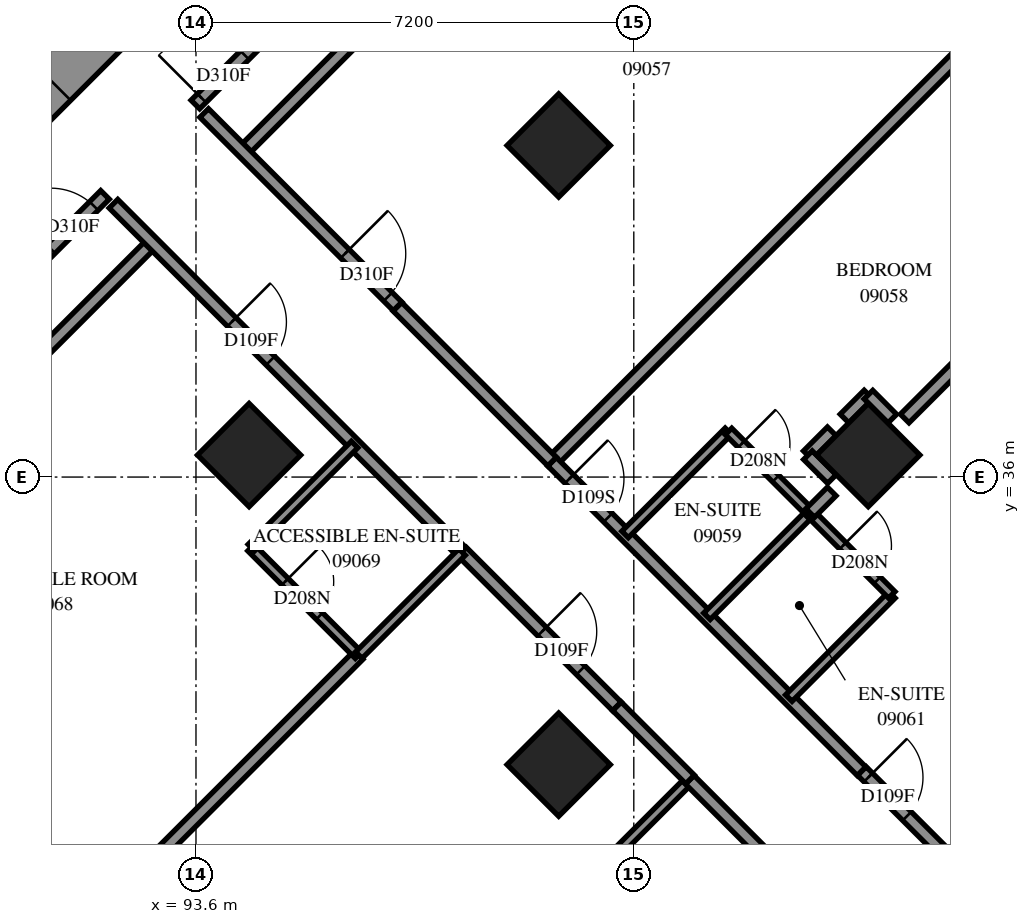
"""IFC4 building model, lengths in metres.
Left out: names, types, materials, properties, quantities, classifications, styles, units other than length and angle.
Written with IfcOpenShell. Run it as: python <this file> out.ifc"""

import sys

from ifc_helpers import new_model, si_unit, direction, frame, frame_2d, origin, origin_2d, place, context, subcontext, project, spatial, polyline, rectangle, outline, extrude, element, fill, save


model = new_model("IFC4")
c1 = context("Model", 3, precision=1e-05, world=origin(), true_north=direction((0.0, 1.0)))
c2 = subcontext(c1, "Body", "Model", "MODEL_VIEW")
j1 = project(units=[si_unit("LENGTHUNIT", "METRE"), si_unit("PLANEANGLEUNIT", "RADIAN")], contexts=[c1])
p1 = place(None, origin())
s1 = spatial("IfcSite", under=j1, at=p1, CompositionType="ELEMENT")
p2 = place(p1, origin())
s2 = spatial("IfcBuilding", under=s1, at=p2, CompositionType="ELEMENT")
p3 = place(p2, frame((0.0, 0.0, 37.2)))
s3 = spatial("IfcBuildingStorey", under=s2, at=p3, CompositionType="ELEMENT", Elevation=37.2)
for number, where, z_axis, x_axis in (
    (1, (99.565, 41.453, 0.0), (0.0, 0.0, 1.0), (0.707, -0.707, 0.0)),
    (2, (94.474, 36.362, 0.0), (0.0, 0.0, 1.0), (0.707, -0.707, 0.0)),
    (3, (104.656, 36.362, 0.0), (0.0, 0.0, 1.0), (0.707, -0.707, 0.0)),
    (4, (99.565, 31.271, 0.0), (0.0, 0.0, 1.0), (0.707, -0.707, 0.0)),
):
    element("IfcColumn", number, at=place(p3, frame(where, z_axis=z_axis, x_axis=x_axis)), inside=s3, PredefinedType="COLUMN", context=c2, shape_type="SweptSolid", body=[
        extrude(rectangle(XDim=1.2, YDim=1.2, at=origin_2d()), origin(), (0.0, 0.0, 1.0), 3.1),
    ])
p4 = place(p3, frame((87.19, 38.554, -0.3), z_axis=(0.0, 0.0, 1.0), x_axis=(0.707103309, 0.7071102534, 0.0)))
e5 = element("IfcWall", 5, at=p4, inside=s3, PredefinedType="SHEAR", context=c2, shape_type="SweptSolid", body=[
    extrude(rectangle(XDim=14.4, YDim=1.0, at=frame_2d((7.2, 0.0))), origin(), (0.0, 0.0, 1.0), 2.7),
])
p5 = place(p4, frame((4.55, 0.0, 0.3)))
e6 = element("IfcOpeningElement", 6, at=p5, cuts=e5, PredefinedType="OPENING", context=c2, shape_type="SweptSolid", body=[
    extrude(rectangle(XDim=1.1, YDim=2.1, at=frame_2d((0.55, 1.05))), frame((0.0, 0.51, 0.0), z_axis=(0.0, -1.0, 0.0), x_axis=(1.0, 0.0, 0.0)), (0.0, 0.0, 1.0), 1.02),
])
p6 = place(p4, frame((11.35, 0.0, 0.3)))
e7 = element("IfcOpeningElement", 7, at=p6, cuts=e5, PredefinedType="OPENING", context=c2, shape_type="SweptSolid", body=[
    extrude(rectangle(XDim=1.1, YDim=2.1, at=frame_2d((0.55, 1.05))), frame((0.0, 0.51, 0.0), z_axis=(0.0, -1.0, 0.0), x_axis=(1.0, 0.0, 0.0)), (0.0, 0.0, 1.0), 1.02),
])
p7 = place(p3, frame((88.129, 30.665, 0.0), z_axis=(0.0, 0.0, 1.0), x_axis=(0.774508234, -0.6325638271, 0.0)))
e8 = element("IfcWall", 8, at=p7, inside=s3, PredefinedType="SOLIDWALL", context=c2, shape_type="SweptSolid", body=[
    extrude(outline(polyline([(-0.028, -0.275), (3.868, -0.275), (3.924, 0.275), (0.028, 0.275), (-0.028, -0.275)])), origin(), (0.0, 0.0, 1.0), 3.1),
])
p8 = place(p7, frame((0.678, 0.0, 0.5)))
e9 = element("IfcOpeningElement", 9, at=p8, cuts=e8, PredefinedType="OPENING", context=c2, shape_type="SweptSolid", body=[
    extrude(rectangle(XDim=2.8, YDim=2.45, at=frame_2d((1.4, 1.225))), frame((0.0, 0.285, 0.0), z_axis=(0.0, -1.0, 0.0), x_axis=(1.0, 0.0, 0.0)), (0.0, 0.0, 1.0), 0.57),
])
p9 = place(p3, frame((99.459, 36.255, 0.0), z_axis=(0.0, 0.0, 1.0), x_axis=(0.7071907307, 0.7070228217, 0.0)))
e10 = element("IfcWall", 10, at=p9, inside=s3, PredefinedType="PARTITIONING", context=c2, shape_type="SweptSolid", body=[
    extrude(rectangle(XDim=11.911, YDim=0.2, at=frame_2d((5.956, 0.0))), origin(), (0.0, 0.0, 1.0), 3.1),
])
p10 = place(p3, frame((94.367, 41.349, 0.0), z_axis=(0.0, 0.0, 1.0), x_axis=(0.7071109931, 0.7071025693, 0.0)))
e11 = element("IfcWall", 11, at=p10, inside=s3, PredefinedType="PARTITIONING", context=c2, shape_type="SweptSolid", body=[
    extrude(rectangle(XDim=11.871, YDim=0.2, at=frame_2d((5.936, 0.0))), origin(), (0.0, 0.0, 1.0), 3.1),
])
p11 = place(p3, frame((93.59, 42.126, 0.0), z_axis=(0.0, 0.0, 1.0), x_axis=(0.7071067812, 0.7071067812, 0.0)))
e12 = element("IfcWall", 12, at=p11, inside=s3, PredefinedType="PARTITIONING", context=c2, shape_type="SweptSolid", body=[
    extrude(rectangle(XDim=9.849, YDim=0.2, at=frame_2d((4.924, 0.0))), origin(), (0.0, 0.0, 1.0), 3.1),
])
p12 = place(p11, frame((0.148, 0.0, 0.0)))
e13 = element("IfcOpeningElement", 13, at=p12, cuts=e12, PredefinedType="OPENING", context=c2, shape_type="SweptSolid", body=[
    extrude(rectangle(XDim=1.0, YDim=2.1, at=frame_2d((0.5, 1.05))), frame((0.0, 0.11, 0.0), z_axis=(0.0, -1.0, 0.0), x_axis=(1.0, 0.0, 0.0)), (0.0, 0.0, 1.0), 0.22),
])
p13 = place(p3, frame((86.33, 33.302, 0.0), z_axis=(0.0, 0.0, 1.0), x_axis=(0.7069989149, 0.707214631, 0.0)))
e14 = element("IfcWall", 14, at=p13, inside=s3, PredefinedType="PARTITIONING", context=c2, shape_type="SweptSolid", body=[
    extrude(rectangle(XDim=9.271, YDim=0.2, at=frame_2d((4.636, 0.0))), origin(), (0.0, 0.0, 1.0), 3.1),
])
p14 = place(p3, frame((92.243, 40.495, 0.0), z_axis=(0.0, 0.0, 1.0), x_axis=(0.7071067812, -0.7071067812, 0.0)))
e15 = element("IfcWall", 15, at=p14, inside=s3, PredefinedType="PARTITIONING", context=c2, shape_type="SweptSolid", body=[
    extrude(rectangle(XDim=8.101, YDim=0.2, at=frame_2d((4.05, 0.0))), origin(), (0.0, 0.0, 1.0), 3.1),
])
p15 = place(p14, frame((2.75, 0.0, 0.0)))
e16 = element("IfcOpeningElement", 16, at=p15, cuts=e15, PredefinedType="OPENING", context=c2, shape_type="SweptSolid", body=[
    extrude(rectangle(XDim=0.9, YDim=2.1, at=frame_2d((0.45, 1.05))), frame((0.0, 0.11, 0.0), z_axis=(0.0, -1.0, 0.0), x_axis=(1.0, 0.0, 0.0)), (0.0, 0.0, 1.0), 0.22),
])
p16 = place(p3, frame((86.836, 35.372, 0.0), z_axis=(0.0, 0.0, 1.0), x_axis=(0.7071067812, 0.7071067812, 0.0)))
e17 = element("IfcWall", 17, at=p16, inside=s3, PredefinedType="PARTITIONING", context=c2, shape_type="SweptSolid", body=[
    extrude(rectangle(XDim=7.45, YDim=0.2, at=frame_2d((3.725, 0.0))), origin(), (0.0, 0.0, 1.0), 3.1),
])
p17 = place(p16, frame((6.192, 0.0, 0.0)))
e18 = element("IfcOpeningElement", 18, at=p17, cuts=e17, PredefinedType="OPENING", context=c2, shape_type="SweptSolid", body=[
    extrude(rectangle(XDim=1.0, YDim=2.1, at=frame_2d((0.5, 1.05))), frame((0.0, 0.11, 0.0), z_axis=(0.0, -1.0, 0.0), x_axis=(1.0, 0.0, 0.0)), (0.0, 0.0, 1.0), 0.22),
])
p18 = place(p3, frame((99.455, 36.253, 0.0), z_axis=(0.0, 0.0, 1.0), x_axis=(0.7071067812, -0.7071067812, 0.0)))
e19 = element("IfcWall", 19, at=p18, inside=s3, PredefinedType="PARTITIONING", context=c2, shape_type="SweptSolid", body=[
    extrude(rectangle(XDim=7.201, YDim=0.2, at=frame_2d((3.601, 0.0))), origin(), (0.0, 0.0, 1.0), 3.1),
])
p19 = place(p18, frame((0.401, 0.0, 0.0)))
e20 = element("IfcOpeningElement", 20, at=p19, cuts=e19, PredefinedType="OPENING", context=c2, shape_type="SweptSolid", body=[
    extrude(rectangle(XDim=0.9, YDim=2.1, at=frame_2d((0.45, 1.05))), frame((0.0, 0.11, 0.0), z_axis=(0.0, -1.0, 0.0), x_axis=(1.0, 0.0, 0.0)), (0.0, 0.0, 1.0), 0.22),
])
p20 = place(p3, frame((91.457, 28.255, 0.0), z_axis=(0.0, 0.0, 1.0), x_axis=(0.7071067812, 0.7071067812, 0.0)))
e21 = element("IfcWall", 21, at=p20, inside=s3, PredefinedType="PARTITIONING", context=c2, shape_type="SweptSolid", body=[
    extrude(rectangle(XDim=6.815, YDim=0.2, at=frame_2d((3.408, 0.0))), origin(), (0.0, 0.0, 1.0), 3.1),
])
p21 = place(p3, frame((105.255, 36.963, 0.0), z_axis=(0.0, 0.0, 1.0), x_axis=(0.7071067812, 0.7071067812, 0.0)))
e22 = element("IfcWall", 22, at=p21, inside=s3, PredefinedType="PARTITIONING", context=c2, shape_type="SweptSolid", body=[
    extrude(rectangle(XDim=5.504, YDim=0.2, at=frame_2d((2.752, 0.0))), origin(), (0.0, 0.0, 1.0), 3.1),
])
p22 = place(p3, frame((93.735, 41.987, 0.0), z_axis=(0.0, 0.0, 1.0), x_axis=(0.7071067812, -0.7071067812, 0.0)))
e23 = element("IfcWall", 23, at=p22, inside=s3, PredefinedType="PARTITIONING", context=c2, shape_type="SweptSolid", body=[
    extrude(rectangle(XDim=4.5, YDim=0.2, at=frame_2d((2.25, 0.0))), origin(), (0.0, 0.0, 1.0), 3.1),
])
p23 = place(p22, frame((3.274, 0.0, 0.0)))
e24 = element("IfcOpeningElement", 24, at=p23, cuts=e23, PredefinedType="OPENING", context=c2, shape_type="SweptSolid", body=[
    extrude(rectangle(XDim=1.0, YDim=2.1, at=frame_2d((0.5, 1.05))), frame((0.0, 0.11, 0.0), z_axis=(0.0, -1.0, 0.0), x_axis=(1.0, 0.0, 0.0)), (0.0, 0.0, 1.0), 0.22),
])
p24 = place(p3, frame((96.913, 38.801, 0.0), z_axis=(0.0, 0.0, 1.0), x_axis=(0.7068288851, -0.7073845681, 0.0)))
e25 = element("IfcWall", 25, at=p24, inside=s3, PredefinedType="PARTITIONING", context=c2, shape_type="SweptSolid", body=[
    extrude(rectangle(XDim=3.599, YDim=0.2, at=frame_2d((1.8, 0.0))), origin(), (0.0, 0.0, 1.0), 3.1),
])
p25 = place(p3, frame((97.976, 34.772, 0.0), z_axis=(0.0, 0.0, 1.0), x_axis=(0.7073845681, -0.7068288851, 0.0)))
e26 = element("IfcWall", 26, at=p25, inside=s3, PredefinedType="PARTITIONING", context=c2, shape_type="SweptSolid", body=[
    extrude(rectangle(XDim=3.599, YDim=0.2, at=frame_2d((1.8, 0.0))), origin(), (0.0, 0.0, 1.0), 3.1),
])
p26 = place(p25, frame((1.858, 0.0, 0.0)))
e27 = element("IfcOpeningElement", 27, at=p26, cuts=e26, PredefinedType="OPENING", context=c2, shape_type="SweptSolid", body=[
    extrude(rectangle(XDim=0.9, YDim=2.1, at=frame_2d((0.45, 1.05))), frame((0.0, 0.11, 0.0), z_axis=(0.0, -1.0, 0.0), x_axis=(1.0, 0.0, 0.0)), (0.0, 0.0, 1.0), 0.22),
])
p27 = place(p3, frame((104.551, 31.165, 0.0), z_axis=(0.0, 0.0, 1.0), x_axis=(0.7074545101, -0.7067588812, 0.0)))
e28 = element("IfcWall", 28, at=p27, inside=s3, PredefinedType="PARTITIONING", context=c2, shape_type="SweptSolid", body=[
    extrude(rectangle(XDim=2.875, YDim=0.2, at=frame_2d((1.438, 0.0))), origin(), (0.0, 0.0, 1.0), 3.1),
])
p28 = place(p27, frame((0.148, 0.0, 0.0)))
e29 = element("IfcOpeningElement", 29, at=p28, cuts=e28, PredefinedType="OPENING", context=c2, shape_type="SweptSolid", body=[
    extrude(rectangle(XDim=0.9, YDim=2.1, at=frame_2d((0.45, 1.05))), frame((0.0, 0.11, 0.0), z_axis=(0.0, -1.0, 0.0), x_axis=(1.0, 0.0, 0.0)), (0.0, 0.0, 1.0), 0.22),
])
p29 = place(p3, frame((94.505, 34.839, 0.0), z_axis=(0.0, 0.0, 1.0), x_axis=(0.7071067812, -0.7071067812, 0.0)))
e30 = element("IfcWall", 30, at=p29, inside=s3, PredefinedType="PARTITIONING", context=c2, shape_type="SweptSolid", body=[
    extrude(rectangle(XDim=2.5, YDim=0.15, at=frame_2d((1.25, 0.0))), origin(), (0.0, 0.0, 1.0), 3.1),
])
p30 = place(p29, frame((0.792, 0.0, 0.0)))
e31 = element("IfcOpeningElement", 31, at=p30, cuts=e30, PredefinedType="OPENING", context=c2, shape_type="SweptSolid", body=[
    extrude(rectangle(XDim=0.8, YDim=2.1, at=frame_2d((0.4, 1.05))), frame((0.0, 0.085, 0.0), z_axis=(0.0, -1.0, 0.0), x_axis=(1.0, 0.0, 0.0)), (0.0, 0.0, 1.0), 0.17),
])
for number, where, z_axis, x_axis in (
    (32, (102.003, 33.711, 0.0), (0.0, 0.0, 1.0), (0.707, 0.707, 0.0)),
    (33, (100.023, 29.327, 0.0), (0.0, 0.0, 1.0), (0.707, 0.707, 0.0)),
):
    element("IfcWall", number, at=place(p3, frame(where, z_axis=z_axis, x_axis=x_axis)), inside=s3, PredefinedType="PARTITIONING", context=c2, shape_type="SweptSolid", body=[
        extrude(rectangle(XDim=2.401, YDim=0.15, at=frame_2d((1.201, 0.0))), origin(), (0.0, 0.0, 1.0), 3.1),
    ])
for number, where, z_axis, x_axis in (
    (34, (96.278, 33.072, 0.0), (0.0, 0.0, 1.0), (0.708, 0.707, 0.0)),
    (35, (94.511, 34.839, 0.0), (0.0, 0.0, 1.0), (0.708, 0.707, 0.0)),
    (36, (100.657, 35.057, 0.0), (0.0, 0.0, 1.0), (0.708, 0.707, 0.0)),
    (37, (103.349, 32.365, 0.0), (0.0, 0.0, 1.0), (0.707, 0.708, 0.0)),
):
    element("IfcWall", number, at=place(p3, frame(where, z_axis=z_axis, x_axis=x_axis)), inside=s3, PredefinedType="PARTITIONING", context=c2, shape_type="SweptSolid", body=[
        extrude(rectangle(XDim=2.4, YDim=0.15, at=frame_2d((1.2, 0.0))), origin(), (0.0, 0.0, 1.0), 3.1),
    ])
p31 = place(p3, frame((103.701, 35.407, 0.0), z_axis=(0.0, 0.0, 1.0), x_axis=(0.7065800724, -0.7076330979, 0.0)))
e38 = element("IfcWall", 38, at=p31, inside=s3, PredefinedType="PARTITIONING", context=c2, shape_type="SweptSolid", body=[
    extrude(rectangle(XDim=1.899, YDim=0.15, at=frame_2d((0.95, 0.0))), origin(), (0.0, 0.0, 1.0), 3.1),
])
p32 = place(p31, frame((0.759, 0.0, 0.0)))
e39 = element("IfcOpeningElement", 39, at=p32, cuts=e38, PredefinedType="OPENING", context=c2, shape_type="SweptSolid", body=[
    extrude(rectangle(XDim=0.8, YDim=2.1, at=frame_2d((0.4, 1.05))), frame((0.0, 0.085, 0.0), z_axis=(0.0, -1.0, 0.0), x_axis=(1.0, 0.0, 0.0)), (0.0, 0.0, 1.0), 0.17),
])
p33 = place(p3, frame((101.72, 31.022, 0.0), z_axis=(0.0, 0.0, 1.0), x_axis=(0.7065800724, -0.7076330979, 0.0)))
e40 = element("IfcWall", 40, at=p33, inside=s3, PredefinedType="PARTITIONING", context=c2, shape_type="SweptSolid", body=[
    extrude(rectangle(XDim=1.899, YDim=0.2, at=frame_2d((0.95, 0.0))), origin(), (0.0, 0.0, 1.0), 3.1),
])
p34 = place(p3, frame((102.358, 36.75, 0.0), z_axis=(0.0, 0.0, 1.0), x_axis=(0.7076330979, -0.7065800724, 0.0)))
e41 = element("IfcWall", 41, at=p34, inside=s3, PredefinedType="PARTITIONING", context=c2, shape_type="SweptSolid", body=[
    extrude(rectangle(XDim=1.899, YDim=0.15, at=frame_2d((0.95, 0.0))), origin(), (0.0, 0.0, 1.0), 3.1),
])
p35 = place(p34, frame((0.296, 0.0, 0.0)))
e42 = element("IfcOpeningElement", 42, at=p35, cuts=e41, PredefinedType="OPENING", context=c2, shape_type="SweptSolid", body=[
    extrude(rectangle(XDim=0.8, YDim=2.1, at=frame_2d((0.4, 1.05))), frame((0.0, 0.085, 0.0), z_axis=(0.0, -1.0, 0.0), x_axis=(1.0, 0.0, 0.0)), (0.0, 0.0, 1.0), 0.17),
])
p36 = place(p3, frame((100.523, 32.229, 0.0), z_axis=(0.0, 0.0, 1.0), x_axis=(0.7071067812, -0.7071067812, 0.0)))
e43 = element("IfcWall", 43, at=p36, inside=s3, PredefinedType="PARTITIONING", context=c2, shape_type="SweptSolid", body=[
    extrude(rectangle(XDim=1.7, YDim=0.2, at=frame_2d((0.85, 0.0))), origin(), (0.0, 0.0, 1.0), 3.1),
])
for number, where, z_axis, x_axis in (
    (44, (103.661, 36.359, 0.0), (0.0, 0.0, 1.0), (0.707, 0.707, 0.0)),
    (45, (104.265, 36.963, 0.0), (0.0, 0.0, 1.0), (0.707, 0.707, 0.0)),
):
    element("IfcWall", number, at=place(p3, frame(where, z_axis=z_axis, x_axis=x_axis)), inside=s3, PredefinedType="PARTITIONING", context=c2, shape_type="SweptSolid", body=[
        extrude(rectangle(XDim=0.557, YDim=0.2, at=frame_2d((0.279, 0.0))), origin(), (0.0, 0.0, 1.0), 3.1),
    ])
for number, where, z_axis, x_axis in (
    (46, (104.659, 37.355, 0.0), (0.0, 0.0, 1.0), (0.705, -0.709, 0.0)),
    (47, (103.664, 36.36, 0.0), (0.0, 0.0, 1.0), (0.709, -0.705, 0.0)),
):
    element("IfcWall", number, at=place(p3, frame(where, z_axis=z_axis, x_axis=x_axis)), inside=s3, PredefinedType="PARTITIONING", context=c2, shape_type="SweptSolid", body=[
        extrude(rectangle(XDim=0.556, YDim=0.2, at=frame_2d((0.278, 0.0))), origin(), (0.0, 0.0, 1.0), 3.1),
    ])
p37 = place(p3, frame((103.701, 35.409, 0.0), z_axis=(0.0, 0.0, 1.0), x_axis=(0.7071067812, 0.7071067812, 0.0)))
e48 = element("IfcWall", 48, at=p37, inside=s3, PredefinedType="PARTITIONING", context=c2, shape_type="SweptSolid", body=[
    extrude(rectangle(XDim=0.501, YDim=0.2, at=frame_2d((0.25, 0.0))), origin(), (0.0, 0.0, 1.0), 3.1),
])
p38 = place(p12, origin())
e49 = element("IfcDoor", 49, at=p38, inside=s3, OperationType="SINGLE_SWING_LEFT", PredefinedType="DOOR", context=c2, shape_type="SweptSolid", body=[
    extrude(rectangle(XDim=1.0, YDim=2.1, at=frame_2d((0.5, 1.05))), frame((0.0, 0.025, 0.0), z_axis=(0.0, -1.0, 0.0), x_axis=(1.0, 0.0, 0.0)), (0.0, 0.0, 1.0), 0.05),
])
fill(e13, e49)
p39 = place(p23, origin())
e50 = element("IfcDoor", 50, at=p39, inside=s3, OperationType="SINGLE_SWING_RIGHT", PredefinedType="DOOR", context=c2, shape_type="SweptSolid", body=[
    extrude(rectangle(XDim=1.0, YDim=2.1, at=frame_2d((0.5, 1.05))), frame((0.0, 0.025, 0.0), z_axis=(0.0, -1.0, 0.0), x_axis=(1.0, 0.0, 0.0)), (0.0, 0.0, 1.0), 0.05),
])
fill(e24, e50)
p40 = place(p19, origin())
e51 = element("IfcDoor", 51, at=p40, inside=s3, OperationType="SINGLE_SWING_RIGHT", PredefinedType="DOOR", context=c2, shape_type="SweptSolid", body=[
    extrude(rectangle(XDim=0.9, YDim=2.1, at=frame_2d((0.45, 1.05))), frame((0.0, 0.025, 0.0), z_axis=(0.0, -1.0, 0.0), x_axis=(1.0, 0.0, 0.0)), (0.0, 0.0, 1.0), 0.05),
])
fill(e20, e51)
p41 = place(p35, origin())
e52 = element("IfcDoor", 52, at=p41, inside=s3, OperationType="SINGLE_SWING_RIGHT", PredefinedType="DOOR", context=c2, shape_type="SweptSolid", body=[
    extrude(rectangle(XDim=0.8, YDim=2.1, at=frame_2d((0.4, 1.05))), frame((0.0, 0.025, 0.0), z_axis=(0.0, -1.0, 0.0), x_axis=(1.0, 0.0, 0.0)), (0.0, 0.0, 1.0), 0.05),
])
fill(e42, e52)
p42 = place(p28, origin())
e53 = element("IfcDoor", 53, at=p42, inside=s3, OperationType="SINGLE_SWING_LEFT", PredefinedType="DOOR", context=c2, shape_type="SweptSolid", body=[
    extrude(rectangle(XDim=0.9, YDim=2.1, at=frame_2d((0.45, 1.05))), frame((0.0, 0.025, 0.0), z_axis=(0.0, -1.0, 0.0), x_axis=(1.0, 0.0, 0.0)), (0.0, 0.0, 1.0), 0.05),
])
fill(e29, e53)
p43 = place(p32, origin())
e54 = element("IfcDoor", 54, at=p43, inside=s3, OperationType="SINGLE_SWING_RIGHT", PredefinedType="DOOR", context=c2, shape_type="SweptSolid", body=[
    extrude(rectangle(XDim=0.8, YDim=2.1, at=frame_2d((0.4, 1.05))), frame((0.0, 0.025, 0.0), z_axis=(0.0, -1.0, 0.0), x_axis=(1.0, 0.0, 0.0)), (0.0, 0.0, 1.0), 0.05),
])
fill(e39, e54)
p44 = place(p17, origin())
e55 = element("IfcDoor", 55, at=p44, inside=s3, OperationType="SINGLE_SWING_RIGHT", PredefinedType="DOOR", context=c2, shape_type="SweptSolid", body=[
    extrude(rectangle(XDim=1.0, YDim=2.1, at=frame_2d((0.5, 1.05))), frame((0.0, 0.025, 0.0), z_axis=(0.0, -1.0, 0.0), x_axis=(1.0, 0.0, 0.0)), (0.0, 0.0, 1.0), 0.05),
])
fill(e18, e55)
p45 = place(p15, origin())
e56 = element("IfcDoor", 56, at=p45, inside=s3, OperationType="SINGLE_SWING_LEFT", PredefinedType="DOOR", context=c2, shape_type="SweptSolid", body=[
    extrude(rectangle(XDim=0.9, YDim=2.1, at=frame_2d((0.45, 1.05))), frame((0.0, 0.025, 0.0), z_axis=(0.0, -1.0, 0.0), x_axis=(1.0, 0.0, 0.0)), (0.0, 0.0, 1.0), 0.05),
])
fill(e16, e56)
p46 = place(p30, origin())
e57 = element("IfcDoor", 57, at=p46, inside=s3, OperationType="SINGLE_SWING_RIGHT", PredefinedType="DOOR", context=c2, shape_type="SweptSolid", body=[
    extrude(rectangle(XDim=0.8, YDim=2.1, at=frame_2d((0.4, 1.05))), frame((0.0, 0.025, 0.0), z_axis=(0.0, -1.0, 0.0), x_axis=(1.0, 0.0, 0.0)), (0.0, 0.0, 1.0), 0.05),
])
fill(e31, e57)
p47 = place(p26, origin())
e58 = element("IfcDoor", 58, at=p47, inside=s3, OperationType="SINGLE_SWING_LEFT", PredefinedType="DOOR", context=c2, shape_type="SweptSolid", body=[
    extrude(rectangle(XDim=0.9, YDim=2.1, at=frame_2d((0.45, 1.05))), frame((0.0, 0.025, 0.0), z_axis=(0.0, -1.0, 0.0), x_axis=(1.0, 0.0, 0.0)), (0.0, 0.0, 1.0), 0.05),
])
fill(e27, e58)
save(model, sys.argv[1])
